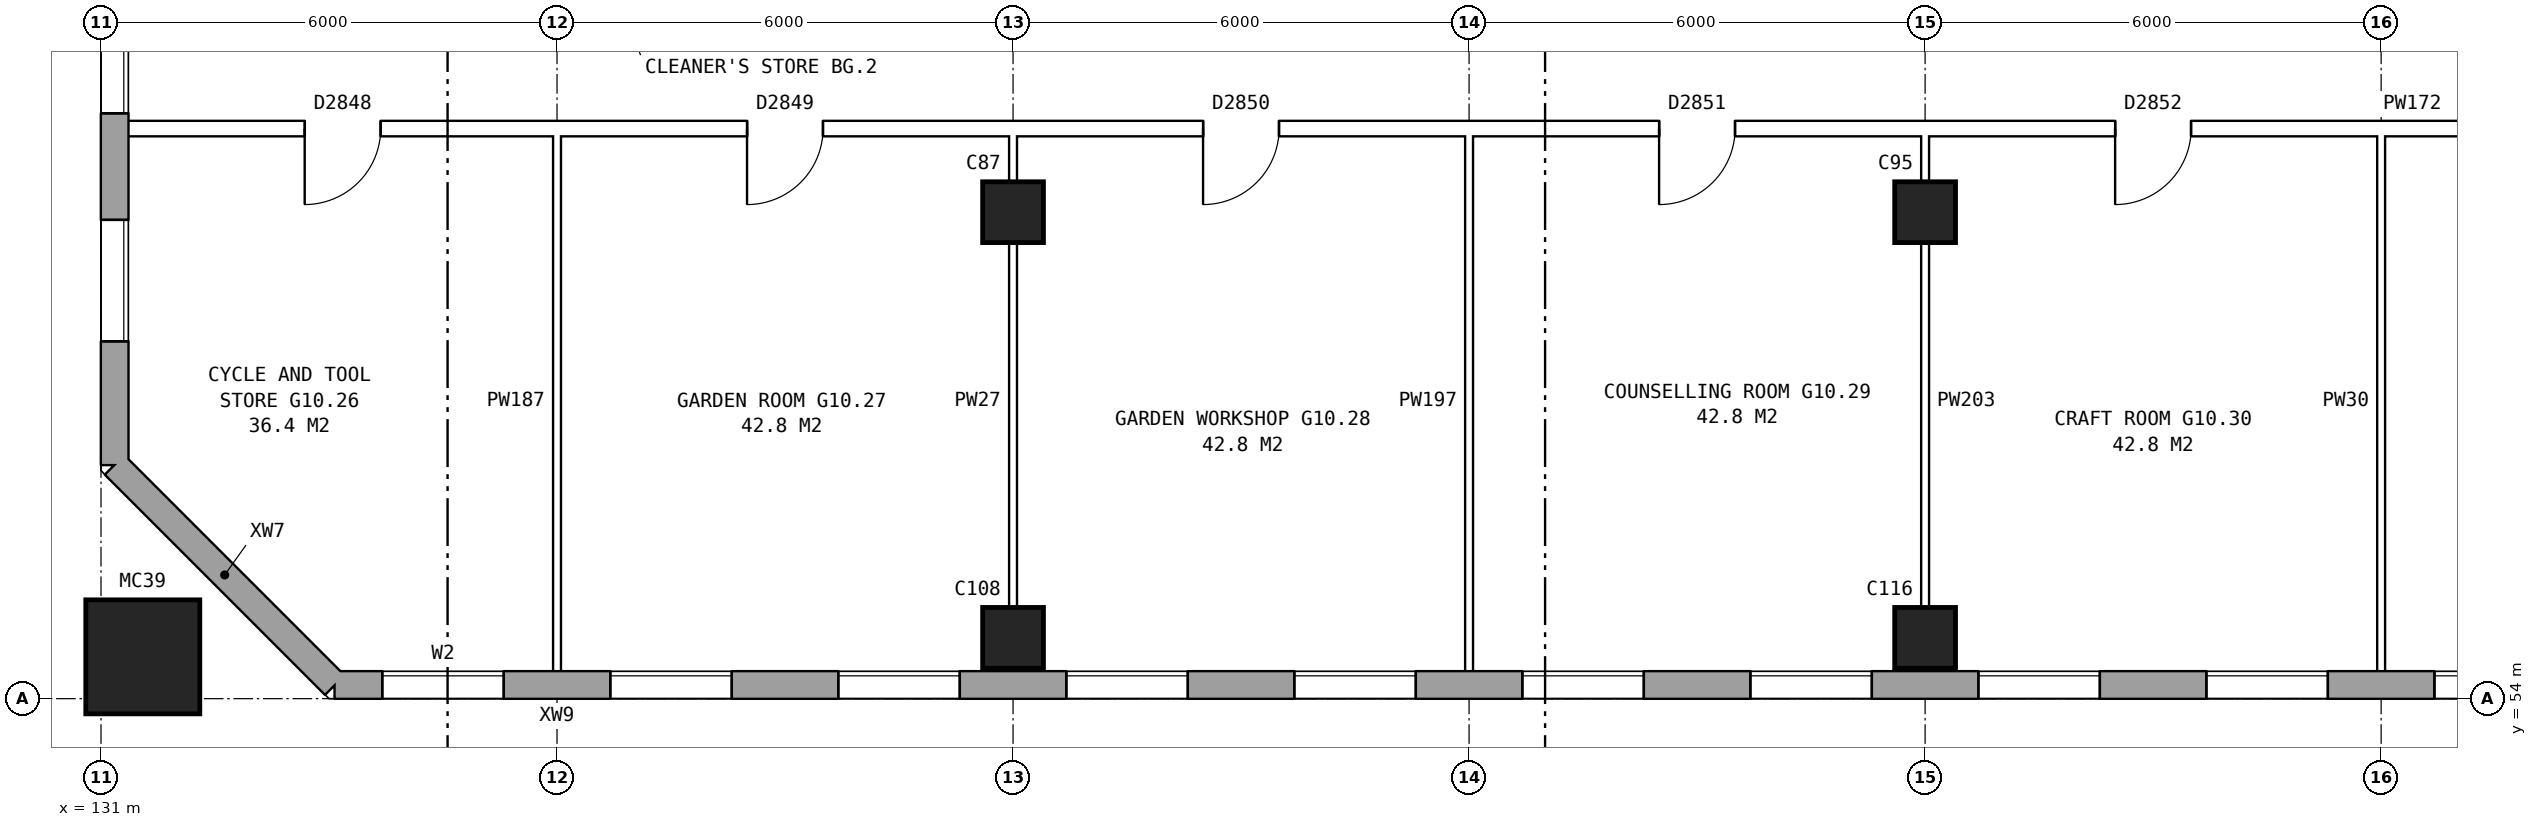
"""IFC4 building model, lengths in metres.
Left out: names, types, materials, properties, quantities, classifications, styles, units other than length and angle.
Written with IfcOpenShell. Run it as: python <this file> out.ifc"""

import sys

from ifc_helpers import new_model, si_unit, direction, frame, frame_2d, origin, origin_2d, place, context, subcontext, project, spatial, rectangle, hollow_rectangle, extrude, element, fill, save


model = new_model("IFC4")
c1 = context("Model", 3, precision=1e-05, world=origin(), true_north=direction((0.0, 1.0)))
c2 = subcontext(c1, "Body", "Model", "MODEL_VIEW")
j1 = project(units=[si_unit("LENGTHUNIT", "METRE"), si_unit("PLANEANGLEUNIT", "RADIAN")], contexts=[c1])
p1 = place(None, origin())
s1 = spatial("IfcSite", under=j1, at=p1, CompositionType="ELEMENT")
p2 = place(p1, origin())
s2 = spatial("IfcBuilding", under=s1, at=p2, CompositionType="ELEMENT")
p3 = place(p2, frame((0.0, 0.0, 38.1)))
s3 = spatial("IfcBuildingStorey", under=s2, at=p3, CompositionType="ELEMENT", Elevation=38.1)
for number, where, z_axis, x_axis in (
    (1, (143.0, 54.8, 0.0), (0.0, 0.0, 1.0), (1.0, 0.0, 0.0)),
    (2, (143.0, 60.4, 0.0), (0.0, 0.0, 1.0), (1.0, 0.0, 0.0)),
    (3, (155.0, 54.8, 0.0), (0.0, 0.0, 1.0), (1.0, 0.0, 0.0)),
    (4, (155.0, 60.4, 0.0), (0.0, 0.0, 1.0), (1.0, 0.0, 0.0)),
):
    element("IfcColumn", number, at=place(p3, frame(where, z_axis=z_axis, x_axis=x_axis)), inside=s3, PredefinedType="COLUMN", context=c2, shape_type="SweptSolid", body=[
        extrude(rectangle(XDim=0.8, YDim=0.8, at=origin_2d()), origin(), (0.0, 0.0, 1.0), 5.6),
    ])
p4 = place(p3, frame((131.55, 54.55, 0.0), z_axis=(0.0, 0.0, 1.0), x_axis=(1.0, 0.0, 0.0)))
e5 = element("IfcColumn", 5, at=p4, inside=s3, PredefinedType="COLUMN", context=c2, shape_type="SweptSolid", body=[
    extrude(hollow_rectangle(XDim=1.5, YDim=1.5, WallThickness=0.08, at=origin_2d()), origin(), (0.0, 0.0, 1.0), 6.2),
])
p5 = place(p3, frame((131.18, 57.075, 0.0), z_axis=(0.0, 0.0, 1.0), x_axis=(0.707106781187, -0.707106781187, 0.0)))
e6 = element("IfcWall", 6, at=p5, inside=s3, PredefinedType="STANDARD", context=c2, shape_type="SweptSolid", body=[
    extrude(rectangle(XDim=4.094, YDim=0.36, at=frame_2d((2.047, 0.0))), origin(), (0.0, 0.0, 1.0), 5.6),
])
p6 = place(p3, frame((134.075, 54.18, 0.0), z_axis=(0.0, 0.0, 1.0), x_axis=(1.0, 0.0, 0.0)))
e7 = element("IfcWall", 7, at=p6, inside=s3, PredefinedType="STANDARD", context=c2, shape_type="SweptSolid", body=[
    extrude(rectangle(XDim=39.351, YDim=0.36, at=frame_2d((19.675, 0.0))), origin(), (0.0, 0.0, 1.0), 5.6),
])
p7 = place(p6, frame((0.625, 0.0, 0.15)))
e8 = element("IfcOpeningElement", 8, at=p7, cuts=e7, PredefinedType="OPENING", context=c2, shape_type="SweptSolid", body=[
    extrude(rectangle(XDim=1.6, YDim=2.4, at=frame_2d((0.8, 1.2))), frame((0.0, 0.19, 0.0), z_axis=(0.0, -1.0, 0.0), x_axis=(1.0, 0.0, 0.0)), (0.0, 0.0, 1.0), 0.38),
])
p8 = place(p6, frame((3.625, 0.0, 0.15)))
e9 = element("IfcOpeningElement", 9, at=p8, cuts=e7, PredefinedType="OPENING", context=c2, shape_type="SweptSolid", body=[
    extrude(rectangle(XDim=1.6, YDim=2.4, at=frame_2d((0.8, 1.2))), frame((0.0, 0.19, 0.0), z_axis=(0.0, -1.0, 0.0), x_axis=(1.0, 0.0, 0.0)), (0.0, 0.0, 1.0), 0.38),
])
p9 = place(p6, frame((6.625, 0.0, 0.15)))
e10 = element("IfcOpeningElement", 10, at=p9, cuts=e7, PredefinedType="OPENING", context=c2, shape_type="SweptSolid", body=[
    extrude(rectangle(XDim=1.6, YDim=2.4, at=frame_2d((0.8, 1.2))), frame((0.0, 0.19, 0.0), z_axis=(0.0, -1.0, 0.0), x_axis=(1.0, 0.0, 0.0)), (0.0, 0.0, 1.0), 0.38),
])
p10 = place(p6, frame((9.625, 0.0, 0.15)))
e11 = element("IfcOpeningElement", 11, at=p10, cuts=e7, PredefinedType="OPENING", context=c2, shape_type="SweptSolid", body=[
    extrude(rectangle(XDim=1.6, YDim=2.4, at=frame_2d((0.8, 1.2))), frame((0.0, 0.19, 0.0), z_axis=(0.0, -1.0, 0.0), x_axis=(1.0, 0.0, 0.0)), (0.0, 0.0, 1.0), 0.38),
])
p11 = place(p6, frame((12.625, 0.0, 0.15)))
e12 = element("IfcOpeningElement", 12, at=p11, cuts=e7, PredefinedType="OPENING", context=c2, shape_type="SweptSolid", body=[
    extrude(rectangle(XDim=1.6, YDim=2.4, at=frame_2d((0.8, 1.2))), frame((0.0, 0.19, 0.0), z_axis=(0.0, -1.0, 0.0), x_axis=(1.0, 0.0, 0.0)), (0.0, 0.0, 1.0), 0.38),
])
p12 = place(p6, frame((15.625, 0.0, 0.15)))
e13 = element("IfcOpeningElement", 13, at=p12, cuts=e7, PredefinedType="OPENING", context=c2, shape_type="SweptSolid", body=[
    extrude(rectangle(XDim=1.6, YDim=2.4, at=frame_2d((0.8, 1.2))), frame((0.0, 0.19, 0.0), z_axis=(0.0, -1.0, 0.0), x_axis=(1.0, 0.0, 0.0)), (0.0, 0.0, 1.0), 0.38),
])
p13 = place(p6, frame((18.625, 0.0, 0.15)))
e14 = element("IfcOpeningElement", 14, at=p13, cuts=e7, PredefinedType="OPENING", context=c2, shape_type="SweptSolid", body=[
    extrude(rectangle(XDim=1.6, YDim=2.4, at=frame_2d((0.8, 1.2))), frame((0.0, 0.19, 0.0), z_axis=(0.0, -1.0, 0.0), x_axis=(1.0, 0.0, 0.0)), (0.0, 0.0, 1.0), 0.38),
])
p14 = place(p6, frame((21.625, 0.0, 0.15)))
e15 = element("IfcOpeningElement", 15, at=p14, cuts=e7, PredefinedType="OPENING", context=c2, shape_type="SweptSolid", body=[
    extrude(rectangle(XDim=1.6, YDim=2.4, at=frame_2d((0.8, 1.2))), frame((0.0, 0.19, 0.0), z_axis=(0.0, -1.0, 0.0), x_axis=(1.0, 0.0, 0.0)), (0.0, 0.0, 1.0), 0.38),
])
p15 = place(p6, frame((24.625, 0.0, 0.15)))
e16 = element("IfcOpeningElement", 16, at=p15, cuts=e7, PredefinedType="OPENING", context=c2, shape_type="SweptSolid", body=[
    extrude(rectangle(XDim=1.6, YDim=2.4, at=frame_2d((0.8, 1.2))), frame((0.0, 0.19, 0.0), z_axis=(0.0, -1.0, 0.0), x_axis=(1.0, 0.0, 0.0)), (0.0, 0.0, 1.0), 0.38),
])
p16 = place(p6, frame((27.625, 0.0, 0.15)))
e17 = element("IfcOpeningElement", 17, at=p16, cuts=e7, PredefinedType="OPENING", context=c2, shape_type="SweptSolid", body=[
    extrude(rectangle(XDim=1.6, YDim=2.4, at=frame_2d((0.8, 1.2))), frame((0.0, 0.19, 0.0), z_axis=(0.0, -1.0, 0.0), x_axis=(1.0, 0.0, 0.0)), (0.0, 0.0, 1.0), 0.38),
])
p17 = place(p6, frame((30.625, 0.0, 0.15)))
e18 = element("IfcOpeningElement", 18, at=p17, cuts=e7, PredefinedType="OPENING", context=c2, shape_type="SweptSolid", body=[
    extrude(rectangle(XDim=1.6, YDim=2.4, at=frame_2d((0.8, 1.2))), frame((0.0, 0.19, 0.0), z_axis=(0.0, -1.0, 0.0), x_axis=(1.0, 0.0, 0.0)), (0.0, 0.0, 1.0), 0.38),
])
p18 = place(p6, frame((33.625, 0.0, 0.15)))
e19 = element("IfcOpeningElement", 19, at=p18, cuts=e7, PredefinedType="OPENING", context=c2, shape_type="SweptSolid", body=[
    extrude(rectangle(XDim=1.6, YDim=2.4, at=frame_2d((0.8, 1.2))), frame((0.0, 0.19, 0.0), z_axis=(0.0, -1.0, 0.0), x_axis=(1.0, 0.0, 0.0)), (0.0, 0.0, 1.0), 0.38),
])
p19 = place(p6, frame((36.625, 0.0, 0.15)))
e20 = element("IfcOpeningElement", 20, at=p19, cuts=e7, PredefinedType="OPENING", context=c2, shape_type="SweptSolid", body=[
    extrude(rectangle(XDim=1.6, YDim=2.4, at=frame_2d((0.8, 1.2))), frame((0.0, 0.19, 0.0), z_axis=(0.0, -1.0, 0.0), x_axis=(1.0, 0.0, 0.0)), (0.0, 0.0, 1.0), 0.38),
])
p20 = place(p3, frame((131.18, 82.925, 0.0), z_axis=(0.0, 0.0, 1.0), x_axis=(0.0, -1.0, 0.0)))
e21 = element("IfcWall", 21, at=p20, inside=s3, PredefinedType="STANDARD", context=c2, shape_type="SweptSolid", body=[
    extrude(rectangle(XDim=25.851, YDim=0.36, at=frame_2d((12.925, 0.0))), origin(), (0.0, 0.0, 1.0), 5.6),
])
p21 = place(p20, frame((1.625, 0.0, 0.15)))
e22 = element("IfcOpeningElement", 22, at=p21, cuts=e21, PredefinedType="OPENING", context=c2, shape_type="SweptSolid", body=[
    extrude(rectangle(XDim=1.6, YDim=2.4, at=frame_2d((0.8, 1.2))), frame((0.0, 0.19, 0.0), z_axis=(0.0, -1.0, 0.0), x_axis=(1.0, 0.0, 0.0)), (0.0, 0.0, 1.0), 0.38),
])
p22 = place(p20, frame((4.625, 0.0, 0.15)))
e23 = element("IfcOpeningElement", 23, at=p22, cuts=e21, PredefinedType="OPENING", context=c2, shape_type="SweptSolid", body=[
    extrude(rectangle(XDim=1.6, YDim=2.4, at=frame_2d((0.8, 1.2))), frame((0.0, 0.19, 0.0), z_axis=(0.0, -1.0, 0.0), x_axis=(1.0, 0.0, 0.0)), (0.0, 0.0, 1.0), 0.38),
])
p23 = place(p20, frame((19.625, 0.0, 0.15)))
e24 = element("IfcOpeningElement", 24, at=p23, cuts=e21, PredefinedType="OPENING", context=c2, shape_type="SweptSolid", body=[
    extrude(rectangle(XDim=1.6, YDim=2.4, at=frame_2d((0.8, 1.2))), frame((0.0, 0.19, 0.0), z_axis=(0.0, -1.0, 0.0), x_axis=(1.0, 0.0, 0.0)), (0.0, 0.0, 1.0), 0.38),
])
p24 = place(p20, frame((22.625, 0.0, 0.15)))
e25 = element("IfcOpeningElement", 25, at=p24, cuts=e21, PredefinedType="OPENING", context=c2, shape_type="SweptSolid", body=[
    extrude(rectangle(XDim=1.6, YDim=2.4, at=frame_2d((0.8, 1.2))), frame((0.0, 0.19, 0.0), z_axis=(0.0, -1.0, 0.0), x_axis=(1.0, 0.0, 0.0)), (0.0, 0.0, 1.0), 0.38),
])
p25 = place(p3, frame((131.24, 61.5, 0.0), z_axis=(0.0, 0.0, 1.0), x_axis=(1.0, 0.0, 0.0)))
e26 = element("IfcWall", 26, at=p25, inside=s3, PredefinedType="PARTITIONING", context=c2, shape_type="SweptSolid", body=[
    extrude(rectangle(XDim=37.5, YDim=0.2, at=frame_2d((18.75, 0.0))), origin(), (0.0, 0.0, 1.0), 5.6),
])
p26 = place(p25, frame((2.44, 0.0, 0.0)))
e27 = element("IfcOpeningElement", 27, at=p26, cuts=e26, PredefinedType="OPENING", context=c2, shape_type="SweptSolid", body=[
    extrude(rectangle(XDim=1.0, YDim=2.1, at=frame_2d((0.5, 1.05))), frame((0.0, 0.11, 0.0), z_axis=(0.0, -1.0, 0.0), x_axis=(1.0, 0.0, 0.0)), (0.0, 0.0, 1.0), 0.22),
])
p27 = place(p25, frame((8.26, 0.0, 0.0)))
e28 = element("IfcOpeningElement", 28, at=p27, cuts=e26, PredefinedType="OPENING", context=c2, shape_type="SweptSolid", body=[
    extrude(rectangle(XDim=1.0, YDim=2.1, at=frame_2d((0.5, 1.05))), frame((0.0, 0.11, 0.0), z_axis=(0.0, -1.0, 0.0), x_axis=(1.0, 0.0, 0.0)), (0.0, 0.0, 1.0), 0.22),
])
p28 = place(p25, frame((14.26, 0.0, 0.0)))
e29 = element("IfcOpeningElement", 29, at=p28, cuts=e26, PredefinedType="OPENING", context=c2, shape_type="SweptSolid", body=[
    extrude(rectangle(XDim=1.0, YDim=2.1, at=frame_2d((0.5, 1.05))), frame((0.0, 0.11, 0.0), z_axis=(0.0, -1.0, 0.0), x_axis=(1.0, 0.0, 0.0)), (0.0, 0.0, 1.0), 0.22),
])
p29 = place(p25, frame((20.26, 0.0, 0.0)))
e30 = element("IfcOpeningElement", 30, at=p29, cuts=e26, PredefinedType="OPENING", context=c2, shape_type="SweptSolid", body=[
    extrude(rectangle(XDim=1.0, YDim=2.1, at=frame_2d((0.5, 1.05))), frame((0.0, 0.11, 0.0), z_axis=(0.0, -1.0, 0.0), x_axis=(1.0, 0.0, 0.0)), (0.0, 0.0, 1.0), 0.22),
])
p30 = place(p25, frame((26.26, 0.0, 0.0)))
e31 = element("IfcOpeningElement", 31, at=p30, cuts=e26, PredefinedType="OPENING", context=c2, shape_type="SweptSolid", body=[
    extrude(rectangle(XDim=1.0, YDim=2.1, at=frame_2d((0.5, 1.05))), frame((0.0, 0.11, 0.0), z_axis=(0.0, -1.0, 0.0), x_axis=(1.0, 0.0, 0.0)), (0.0, 0.0, 1.0), 0.22),
])
p31 = place(p25, frame((33.08, 0.0, 0.0)))
e32 = element("IfcOpeningElement", 32, at=p31, cuts=e26, PredefinedType="OPENING", context=c2, shape_type="SweptSolid", body=[
    extrude(rectangle(XDim=1.0, YDim=2.1, at=frame_2d((0.5, 1.05))), frame((0.0, 0.11, 0.0), z_axis=(0.0, -1.0, 0.0), x_axis=(1.0, 0.0, 0.0)), (0.0, 0.0, 1.0), 0.22),
])
for number, where, z_axis, x_axis in (
    (33, (137.0, 54.24, 0.0), (0.0, 0.0, 1.0), (0.0, 1.0, 0.0)),
    (34, (143.0, 54.24, 0.0), (0.0, 0.0, 1.0), (0.0, 1.0, 0.0)),
    (35, (149.0, 54.24, 0.0), (0.0, 0.0, 1.0), (0.0, 1.0, 0.0)),
    (36, (155.0, 54.24, 0.0), (0.0, 0.0, 1.0), (0.0, 1.0, 0.0)),
    (37, (161.0, 54.24, 0.0), (0.0, 0.0, 1.0), (0.0, 1.0, 0.0)),
):
    element("IfcWall", number, at=place(p3, frame(where, z_axis=z_axis, x_axis=x_axis)), inside=s3, PredefinedType="PARTITIONING", context=c2, shape_type="SweptSolid", body=[
        extrude(rectangle(XDim=7.36, YDim=0.1, at=frame_2d((3.68, 0.0))), origin(), (0.0, 0.0, 1.0), 5.6),
    ])
p32 = place(p7, origin())
e38 = element("IfcWindow", 38, at=p32, inside=s3, PartitioningType="SINGLE_PANEL", PredefinedType="WINDOW", context=c2, shape_type="SweptSolid", body=[
    extrude(rectangle(XDim=1.6, YDim=2.4, at=frame_2d((0.8, 1.2))), frame((0.0, 0.15, 0.0), z_axis=(0.0, -1.0, 0.0), x_axis=(1.0, 0.0, 0.0)), (0.0, 0.0, 1.0), 0.06),
])
fill(e8, e38)
p33 = place(p8, origin())
e39 = element("IfcWindow", 39, at=p33, inside=s3, PartitioningType="SINGLE_PANEL", PredefinedType="WINDOW", context=c2, shape_type="SweptSolid", body=[
    extrude(rectangle(XDim=1.6, YDim=2.4, at=frame_2d((0.8, 1.2))), frame((0.0, 0.15, 0.0), z_axis=(0.0, -1.0, 0.0), x_axis=(1.0, 0.0, 0.0)), (0.0, 0.0, 1.0), 0.06),
])
fill(e9, e39)
p34 = place(p9, origin())
e40 = element("IfcWindow", 40, at=p34, inside=s3, PartitioningType="SINGLE_PANEL", PredefinedType="WINDOW", context=c2, shape_type="SweptSolid", body=[
    extrude(rectangle(XDim=1.6, YDim=2.4, at=frame_2d((0.8, 1.2))), frame((0.0, 0.15, 0.0), z_axis=(0.0, -1.0, 0.0), x_axis=(1.0, 0.0, 0.0)), (0.0, 0.0, 1.0), 0.06),
])
fill(e10, e40)
p35 = place(p10, origin())
e41 = element("IfcWindow", 41, at=p35, inside=s3, PartitioningType="SINGLE_PANEL", PredefinedType="WINDOW", context=c2, shape_type="SweptSolid", body=[
    extrude(rectangle(XDim=1.6, YDim=2.4, at=frame_2d((0.8, 1.2))), frame((0.0, 0.15, 0.0), z_axis=(0.0, -1.0, 0.0), x_axis=(1.0, 0.0, 0.0)), (0.0, 0.0, 1.0), 0.06),
])
fill(e11, e41)
p36 = place(p11, origin())
e42 = element("IfcWindow", 42, at=p36, inside=s3, PartitioningType="SINGLE_PANEL", PredefinedType="WINDOW", context=c2, shape_type="SweptSolid", body=[
    extrude(rectangle(XDim=1.6, YDim=2.4, at=frame_2d((0.8, 1.2))), frame((0.0, 0.15, 0.0), z_axis=(0.0, -1.0, 0.0), x_axis=(1.0, 0.0, 0.0)), (0.0, 0.0, 1.0), 0.06),
])
fill(e12, e42)
p37 = place(p12, origin())
e43 = element("IfcWindow", 43, at=p37, inside=s3, PartitioningType="SINGLE_PANEL", PredefinedType="WINDOW", context=c2, shape_type="SweptSolid", body=[
    extrude(rectangle(XDim=1.6, YDim=2.4, at=frame_2d((0.8, 1.2))), frame((0.0, 0.15, 0.0), z_axis=(0.0, -1.0, 0.0), x_axis=(1.0, 0.0, 0.0)), (0.0, 0.0, 1.0), 0.06),
])
fill(e13, e43)
p38 = place(p13, origin())
e44 = element("IfcWindow", 44, at=p38, inside=s3, PartitioningType="SINGLE_PANEL", PredefinedType="WINDOW", context=c2, shape_type="SweptSolid", body=[
    extrude(rectangle(XDim=1.6, YDim=2.4, at=frame_2d((0.8, 1.2))), frame((0.0, 0.15, 0.0), z_axis=(0.0, -1.0, 0.0), x_axis=(1.0, 0.0, 0.0)), (0.0, 0.0, 1.0), 0.06),
])
fill(e14, e44)
p39 = place(p14, origin())
e45 = element("IfcWindow", 45, at=p39, inside=s3, PartitioningType="SINGLE_PANEL", PredefinedType="WINDOW", context=c2, shape_type="SweptSolid", body=[
    extrude(rectangle(XDim=1.6, YDim=2.4, at=frame_2d((0.8, 1.2))), frame((0.0, 0.15, 0.0), z_axis=(0.0, -1.0, 0.0), x_axis=(1.0, 0.0, 0.0)), (0.0, 0.0, 1.0), 0.06),
])
fill(e15, e45)
p40 = place(p15, origin())
e46 = element("IfcWindow", 46, at=p40, inside=s3, PartitioningType="SINGLE_PANEL", PredefinedType="WINDOW", context=c2, shape_type="SweptSolid", body=[
    extrude(rectangle(XDim=1.6, YDim=2.4, at=frame_2d((0.8, 1.2))), frame((0.0, 0.15, 0.0), z_axis=(0.0, -1.0, 0.0), x_axis=(1.0, 0.0, 0.0)), (0.0, 0.0, 1.0), 0.06),
])
fill(e16, e46)
p41 = place(p16, origin())
e47 = element("IfcWindow", 47, at=p41, inside=s3, PartitioningType="SINGLE_PANEL", PredefinedType="WINDOW", context=c2, shape_type="SweptSolid", body=[
    extrude(rectangle(XDim=1.6, YDim=2.4, at=frame_2d((0.8, 1.2))), frame((0.0, 0.15, 0.0), z_axis=(0.0, -1.0, 0.0), x_axis=(1.0, 0.0, 0.0)), (0.0, 0.0, 1.0), 0.06),
])
fill(e17, e47)
p42 = place(p23, origin())
e48 = element("IfcWindow", 48, at=p42, inside=s3, PartitioningType="SINGLE_PANEL", PredefinedType="WINDOW", context=c2, shape_type="SweptSolid", body=[
    extrude(rectangle(XDim=1.6, YDim=2.4, at=frame_2d((0.8, 1.2))), frame((0.0, 0.15, 0.0), z_axis=(0.0, -1.0, 0.0), x_axis=(1.0, 0.0, 0.0)), (0.0, 0.0, 1.0), 0.06),
])
fill(e24, e48)
p43 = place(p24, origin())
e49 = element("IfcWindow", 49, at=p43, inside=s3, PartitioningType="SINGLE_PANEL", PredefinedType="WINDOW", context=c2, shape_type="SweptSolid", body=[
    extrude(rectangle(XDim=1.6, YDim=2.4, at=frame_2d((0.8, 1.2))), frame((0.0, 0.15, 0.0), z_axis=(0.0, -1.0, 0.0), x_axis=(1.0, 0.0, 0.0)), (0.0, 0.0, 1.0), 0.06),
])
fill(e25, e49)
p44 = place(p26, frame((1.0, 0.0, 0.0), z_axis=(0.0, 0.0, 1.0), x_axis=(-1.0, 0.0, 0.0)))
e50 = element("IfcDoor", 50, at=p44, inside=s3, OperationType="SINGLE_SWING_RIGHT", PredefinedType="DOOR", context=c2, shape_type="SweptSolid", body=[
    extrude(rectangle(XDim=1.0, YDim=2.1, at=frame_2d((0.5, 1.05))), frame((0.0, 0.025, 0.0), z_axis=(0.0, -1.0, 0.0), x_axis=(1.0, 0.0, 0.0)), (0.0, 0.0, 1.0), 0.05),
])
fill(e27, e50)
p45 = place(p27, frame((1.0, 0.0, 0.0), z_axis=(0.0, 0.0, 1.0), x_axis=(-1.0, 0.0, 0.0)))
e51 = element("IfcDoor", 51, at=p45, inside=s3, OperationType="SINGLE_SWING_RIGHT", PredefinedType="DOOR", context=c2, shape_type="SweptSolid", body=[
    extrude(rectangle(XDim=1.0, YDim=2.1, at=frame_2d((0.5, 1.05))), frame((0.0, 0.025, 0.0), z_axis=(0.0, -1.0, 0.0), x_axis=(1.0, 0.0, 0.0)), (0.0, 0.0, 1.0), 0.05),
])
fill(e28, e51)
p46 = place(p28, frame((1.0, 0.0, 0.0), z_axis=(0.0, 0.0, 1.0), x_axis=(-1.0, 0.0, 0.0)))
e52 = element("IfcDoor", 52, at=p46, inside=s3, OperationType="SINGLE_SWING_RIGHT", PredefinedType="DOOR", context=c2, shape_type="SweptSolid", body=[
    extrude(rectangle(XDim=1.0, YDim=2.1, at=frame_2d((0.5, 1.05))), frame((0.0, 0.025, 0.0), z_axis=(0.0, -1.0, 0.0), x_axis=(1.0, 0.0, 0.0)), (0.0, 0.0, 1.0), 0.05),
])
fill(e29, e52)
p47 = place(p29, frame((1.0, 0.0, 0.0), z_axis=(0.0, 0.0, 1.0), x_axis=(-1.0, 0.0, 0.0)))
e53 = element("IfcDoor", 53, at=p47, inside=s3, OperationType="SINGLE_SWING_RIGHT", PredefinedType="DOOR", context=c2, shape_type="SweptSolid", body=[
    extrude(rectangle(XDim=1.0, YDim=2.1, at=frame_2d((0.5, 1.05))), frame((0.0, 0.025, 0.0), z_axis=(0.0, -1.0, 0.0), x_axis=(1.0, 0.0, 0.0)), (0.0, 0.0, 1.0), 0.05),
])
fill(e30, e53)
p48 = place(p30, frame((1.0, 0.0, 0.0), z_axis=(0.0, 0.0, 1.0), x_axis=(-1.0, 0.0, 0.0)))
e54 = element("IfcDoor", 54, at=p48, inside=s3, OperationType="SINGLE_SWING_RIGHT", PredefinedType="DOOR", context=c2, shape_type="SweptSolid", body=[
    extrude(rectangle(XDim=1.0, YDim=2.1, at=frame_2d((0.5, 1.05))), frame((0.0, 0.025, 0.0), z_axis=(0.0, -1.0, 0.0), x_axis=(1.0, 0.0, 0.0)), (0.0, 0.0, 1.0), 0.05),
])
fill(e31, e54)
save(model, sys.argv[1])
